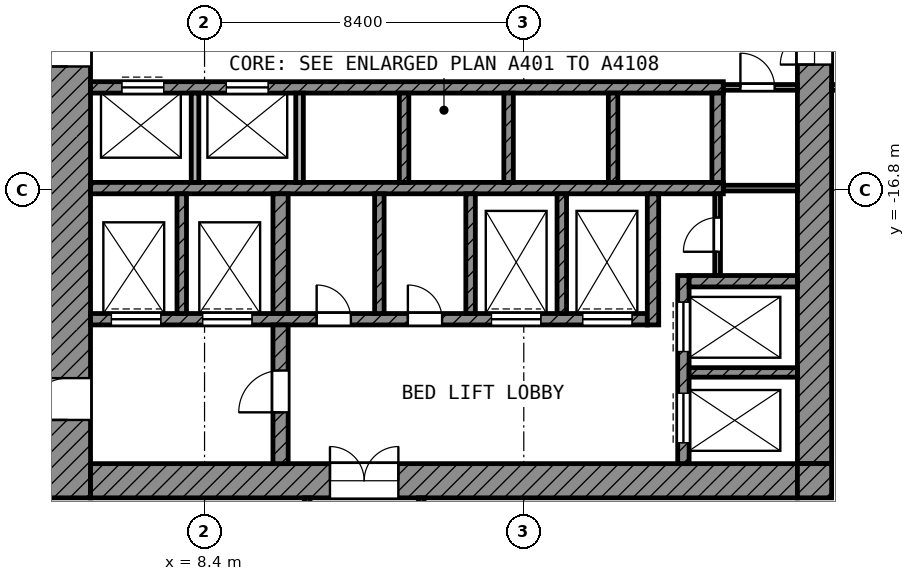
"""IFC4 building model, lengths in metres.
Left out: names, types, materials, properties, quantities, classifications, styles, units other than length and angle.
Written with IfcOpenShell. Run it as: python <this file> out.ifc"""

import sys

from ifc_helpers import new_model, si_unit, direction, frame, frame_2d, origin, place, context, subcontext, project, spatial, rectangle, extrude, element, fill, save


model = new_model("IFC4")
c1 = context("Model", 3, precision=1e-05, world=origin(), true_north=direction((0.0, 1.0)))
c2 = subcontext(c1, "Body", "Model", "MODEL_VIEW")
j1 = project(units=[si_unit("LENGTHUNIT", "METRE"), si_unit("PLANEANGLEUNIT", "RADIAN")], contexts=[c1])
p1 = place(None, origin())
s1 = spatial("IfcSite", under=j1, at=p1, CompositionType="ELEMENT")
p2 = place(p1, origin())
s2 = spatial("IfcBuilding", under=s1, at=p2, CompositionType="ELEMENT")
p3 = place(p2, frame((0.0, 0.0, 175.2)))
s3 = spatial("IfcBuildingStorey", under=s2, at=p3, CompositionType="ELEMENT", Elevation=175.2)
p4 = place(p3, frame((4.8, -24.9, 0.0), z_axis=(0.0, 0.0, 1.0), x_axis=(0.0, 1.0, 0.0)))
e1 = element("IfcWall", 1, at=p4, inside=s3, PredefinedType="SHEAR", context=c2, shape_type="SweptSolid", body=[
    extrude(rectangle(XDim=19.5, YDim=1.2, at=frame_2d((9.75, 0.0))), origin(), (0.0, 0.0, 1.0), 3.6),
])
p5 = place(p4, frame((11.35, 0.0, 0.0)))
e2 = element("IfcOpeningElement", 2, at=p5, cuts=e1, PredefinedType="OPENING", context=c2, shape_type="SweptSolid", body=[
    extrude(rectangle(XDim=1.1, YDim=2.1, at=frame_2d((0.55, 1.05))), frame((0.0, 0.61, 0.0), z_axis=(0.0, -1.0, 0.0), x_axis=(1.0, 0.0, 0.0)), (0.0, 0.0, 1.0), 1.22),
])
p6 = place(p4, frame((2.05, 0.0, 0.0)))
e3 = element("IfcOpeningElement", 3, at=p6, cuts=e1, PredefinedType="OPENING", context=c2, shape_type="SweptSolid", body=[
    extrude(rectangle(XDim=1.1, YDim=2.1, at=frame_2d((0.55, 1.05))), frame((0.0, 0.61, 0.0), z_axis=(0.0, -1.0, 0.0), x_axis=(1.0, 0.0, 0.0)), (0.0, 0.0, 1.0), 1.22),
])
p7 = place(p3, frame((24.45, -24.0, 0.0), z_axis=(0.0, 0.0, 1.0), x_axis=(0.0, 1.0, 0.0)))
e4 = element("IfcWall", 4, at=p7, inside=s3, PredefinedType="SHEAR", context=c2, shape_type="SweptSolid", body=[
    extrude(rectangle(XDim=18.6, YDim=0.9, at=frame_2d((9.3, 0.0))), origin(), (0.0, 0.0, 1.0), 3.6),
])
p8 = place(p7, frame((10.5, 0.0, 0.0)))
e5 = element("IfcOpeningElement", 5, at=p8, cuts=e4, PredefinedType="OPENING", context=c2, shape_type="SweptSolid", body=[
    extrude(rectangle(XDim=1.8, YDim=2.1, at=frame_2d((0.9, 1.05))), frame((0.0, 0.46, 0.0), z_axis=(0.0, -1.0, 0.0), x_axis=(1.0, 0.0, 0.0)), (0.0, 0.0, 1.0), 0.92),
])
p9 = place(p3, frame((5.4, -24.45, 0.0), z_axis=(0.0, 0.0, 1.0), x_axis=(1.0, 0.0, 0.0)))
e6 = element("IfcWall", 6, at=p9, inside=s3, PredefinedType="SHEAR", context=c2, shape_type="SweptSolid", body=[
    extrude(rectangle(XDim=18.6, YDim=0.9, at=frame_2d((9.3, 0.0))), origin(), (0.0, 0.0, 1.0), 3.6),
])
p10 = place(p9, frame((6.3, 0.0, 0.0)))
e7 = element("IfcOpeningElement", 7, at=p10, cuts=e6, PredefinedType="OPENING", context=c2, shape_type="SweptSolid", body=[
    extrude(rectangle(XDim=1.8, YDim=2.1, at=frame_2d((0.9, 1.05))), frame((0.0, 0.46, 0.0), z_axis=(0.0, -1.0, 0.0), x_axis=(1.0, 0.0, 0.0)), (0.0, 0.0, 1.0), 0.92),
])
p11 = place(p3, frame((24.45, -24.9, 0.0), z_axis=(0.0, 0.0, 1.0), x_axis=(0.0, 1.0, 0.0)))
e8 = element("IfcWall", 8, at=p11, inside=s3, PredefinedType="SHEAR", context=c2, shape_type="SweptSolid", body=[
    extrude(rectangle(XDim=0.9, YDim=0.9, at=frame_2d((0.45, 0.0))), origin(), (0.0, 0.0, 1.0), 3.6),
])
p12 = place(p3, frame((5.4, -14.1, 0.0), z_axis=(0.0, 0.0, 1.0), x_axis=(1.0, 0.0, 0.0)))
e9 = element("IfcWall", 9, at=p12, inside=s3, PredefinedType="SHEAR", context=c2, shape_type="SweptSolid", body=[
    extrude(rectangle(XDim=16.65, YDim=0.3, at=frame_2d((8.325, 0.0))), origin(), (0.0, 0.0, 1.0), 3.6),
])
p13 = place(p12, frame((0.825, 0.0, 0.0)))
e10 = element("IfcOpeningElement", 10, at=p13, cuts=e9, PredefinedType="OPENING", context=c2, shape_type="SweptSolid", body=[
    extrude(rectangle(XDim=1.1, YDim=2.1, at=frame_2d((0.55, 1.05))), frame((0.0, 0.16, 0.0), z_axis=(0.0, -1.0, 0.0), x_axis=(1.0, 0.0, 0.0)), (0.0, 0.0, 1.0), 0.32),
])
p14 = place(p12, frame((3.575, 0.0, 0.0)))
e11 = element("IfcOpeningElement", 11, at=p14, cuts=e9, PredefinedType="OPENING", context=c2, shape_type="SweptSolid", body=[
    extrude(rectangle(XDim=1.1, YDim=2.1, at=frame_2d((0.55, 1.05))), frame((0.0, 0.16, 0.0), z_axis=(0.0, -1.0, 0.0), x_axis=(1.0, 0.0, 0.0)), (0.0, 0.0, 1.0), 0.32),
])
p15 = place(p3, frame((5.4, -16.75, 0.0), z_axis=(0.0, 0.0, 1.0), x_axis=(1.0, 0.0, 0.0)))
e12 = element("IfcWall", 12, at=p15, inside=s3, PredefinedType="SHEAR", context=c2, shape_type="SweptSolid", body=[
    extrude(rectangle(XDim=16.65, YDim=0.3, at=frame_2d((8.325, 0.0))), origin(), (0.0, 0.0, 1.0), 3.6),
])
p16 = place(p3, frame((5.4, -20.2, 0.0), z_axis=(0.0, 0.0, 1.0), x_axis=(1.0, 0.0, 0.0)))
e13 = element("IfcWall", 13, at=p16, inside=s3, PredefinedType="SHEAR", context=c2, shape_type="SweptSolid", body=[
    extrude(rectangle(XDim=14.65, YDim=0.3, at=frame_2d((7.325, 0.0))), origin(), (0.0, 0.0, 1.0), 3.6),
])
p17 = place(p16, frame((10.55, 0.0, 0.0)))
e14 = element("IfcOpeningElement", 14, at=p17, cuts=e13, PredefinedType="OPENING", context=c2, shape_type="SweptSolid", body=[
    extrude(rectangle(XDim=1.3, YDim=2.1, at=frame_2d((0.65, 1.05))), frame((0.0, 0.16, 0.0), z_axis=(0.0, -1.0, 0.0), x_axis=(1.0, 0.0, 0.0)), (0.0, 0.0, 1.0), 0.32),
])
p18 = place(p16, frame((12.95, 0.0, 0.0)))
e15 = element("IfcOpeningElement", 15, at=p18, cuts=e13, PredefinedType="OPENING", context=c2, shape_type="SweptSolid", body=[
    extrude(rectangle(XDim=1.3, YDim=2.1, at=frame_2d((0.65, 1.05))), frame((0.0, 0.16, 0.0), z_axis=(0.0, -1.0, 0.0), x_axis=(1.0, 0.0, 0.0)), (0.0, 0.0, 1.0), 0.32),
])
p19 = place(p16, frame((0.55, 0.0, 0.0)))
e16 = element("IfcOpeningElement", 16, at=p19, cuts=e13, PredefinedType="OPENING", context=c2, shape_type="SweptSolid", body=[
    extrude(rectangle(XDim=1.3, YDim=2.1, at=frame_2d((0.65, 1.05))), frame((0.0, 0.16, 0.0), z_axis=(0.0, -1.0, 0.0), x_axis=(1.0, 0.0, 0.0)), (0.0, 0.0, 1.0), 0.32),
])
p20 = place(p16, frame((2.95, 0.0, 0.0)))
e17 = element("IfcOpeningElement", 17, at=p20, cuts=e13, PredefinedType="OPENING", context=c2, shape_type="SweptSolid", body=[
    extrude(rectangle(XDim=1.3, YDim=2.1, at=frame_2d((0.65, 1.05))), frame((0.0, 0.16, 0.0), z_axis=(0.0, -1.0, 0.0), x_axis=(1.0, 0.0, 0.0)), (0.0, 0.0, 1.0), 0.32),
])
p21 = place(p16, frame((5.95, 0.0, 0.0)))
e18 = element("IfcOpeningElement", 18, at=p21, cuts=e13, PredefinedType="OPENING", context=c2, shape_type="SweptSolid", body=[
    extrude(rectangle(XDim=0.9, YDim=2.1, at=frame_2d((0.45, 1.05))), frame((0.0, 0.16, 0.0), z_axis=(0.0, -1.0, 0.0), x_axis=(1.0, 0.0, 0.0)), (0.0, 0.0, 1.0), 0.32),
])
p22 = place(p16, frame((8.35, 0.0, 0.0)))
e19 = element("IfcOpeningElement", 19, at=p22, cuts=e13, PredefinedType="OPENING", context=c2, shape_type="SweptSolid", body=[
    extrude(rectangle(XDim=0.9, YDim=2.1, at=frame_2d((0.45, 1.05))), frame((0.0, 0.16, 0.0), z_axis=(0.0, -1.0, 0.0), x_axis=(1.0, 0.0, 0.0)), (0.0, 0.0, 1.0), 0.32),
])
p23 = place(p3, frame((10.4, -24.0, 0.0), z_axis=(0.0, 0.0, 1.0), x_axis=(0.0, 1.0, 0.0)))
e20 = element("IfcWall", 20, at=p23, inside=s3, PredefinedType="SHEAR", context=c2, shape_type="SweptSolid", body=[
    extrude(rectangle(XDim=3.65, YDim=0.4, at=frame_2d((1.825, 0.0))), origin(), (0.0, 0.0, 1.0), 3.6),
])
p24 = place(p23, frame((1.35, 0.0, 0.0)))
e21 = element("IfcOpeningElement", 21, at=p24, cuts=e20, PredefinedType="OPENING", context=c2, shape_type="SweptSolid", body=[
    extrude(rectangle(XDim=1.1, YDim=2.1, at=frame_2d((0.55, 1.05))), frame((0.0, 0.21, 0.0), z_axis=(0.0, -1.0, 0.0), x_axis=(1.0, 0.0, 0.0)), (0.0, 0.0, 1.0), 0.42),
])
p25 = place(p3, frame((10.4, -20.05, 0.0), z_axis=(0.0, 0.0, 1.0), x_axis=(0.0, 1.0, 0.0)))
e22 = element("IfcWall", 22, at=p25, inside=s3, PredefinedType="SHEAR", context=c2, shape_type="SweptSolid", body=[
    extrude(rectangle(XDim=3.15, YDim=0.4, at=frame_2d((1.575, 0.0))), origin(), (0.0, 0.0, 1.0), 3.6),
])
p26 = place(p3, frame((20.2, -20.35, 0.0), z_axis=(0.0, 0.0, 1.0), x_axis=(0.0, 1.0, 0.0)))
e23 = element("IfcWall", 23, at=p26, inside=s3, PredefinedType="SHEAR", context=c2, shape_type="SweptSolid", body=[
    extrude(rectangle(XDim=3.45, YDim=0.3, at=frame_2d((1.725, 0.0))), origin(), (0.0, 0.0, 1.0), 3.6),
])
p27 = place(p3, frame((21.9, -16.6, 0.0), z_axis=(0.0, 0.0, 1.0), x_axis=(0.0, 1.0, 0.0)))
e24 = element("IfcWall", 24, at=p27, inside=s3, PredefinedType="SHEAR", context=c2, shape_type="SweptSolid", body=[
    extrude(rectangle(XDim=2.35, YDim=0.3, at=frame_2d((1.175, 0.0))), origin(), (0.0, 0.0, 1.0), 3.6),
])
p28 = place(p3, frame((21.15, -19.2, 0.0), z_axis=(0.0, 0.0, 1.0), x_axis=(1.0, 0.0, 0.0)))
e25 = element("IfcWall", 25, at=p28, inside=s3, PredefinedType="SHEAR", context=c2, shape_type="SweptSolid", body=[
    extrude(rectangle(XDim=2.85, YDim=0.3, at=frame_2d((1.425, 0.0))), origin(), (0.0, 0.0, 1.0), 3.6),
])
p29 = place(p3, frame((21.0, -24.0, 0.0), z_axis=(0.0, 0.0, 1.0), x_axis=(0.0, 1.0, 0.0)))
e26 = element("IfcWall", 26, at=p29, inside=s3, PredefinedType="SHEAR", context=c2, shape_type="SweptSolid", body=[
    extrude(rectangle(XDim=4.95, YDim=0.3, at=frame_2d((2.475, 0.0))), origin(), (0.0, 0.0, 1.0), 3.6),
])
p30 = place(p29, frame((2.95, 0.0, 0.0)))
e27 = element("IfcOpeningElement", 27, at=p30, cuts=e26, PredefinedType="OPENING", context=c2, shape_type="SweptSolid", body=[
    extrude(rectangle(XDim=1.3, YDim=2.1, at=frame_2d((0.65, 1.05))), frame((0.0, 0.16, 0.0), z_axis=(0.0, -1.0, 0.0), x_axis=(1.0, 0.0, 0.0)), (0.0, 0.0, 1.0), 0.32),
])
p31 = place(p29, frame((0.55, 0.0, 0.0)))
e28 = element("IfcOpeningElement", 28, at=p31, cuts=e26, PredefinedType="OPENING", context=c2, shape_type="SweptSolid", body=[
    extrude(rectangle(XDim=1.3, YDim=2.1, at=frame_2d((0.65, 1.05))), frame((0.0, 0.16, 0.0), z_axis=(0.0, -1.0, 0.0), x_axis=(1.0, 0.0, 0.0)), (0.0, 0.0, 1.0), 0.32),
])
p32 = place(p3, frame((21.15, -21.6, 0.0), z_axis=(0.0, 0.0, 1.0), x_axis=(1.0, 0.0, 0.0)))
e29 = element("IfcWall", 29, at=p32, inside=s3, PredefinedType="SHEAR", context=c2, shape_type="SweptSolid", body=[
    extrude(rectangle(XDim=2.85, YDim=0.25, at=frame_2d((1.425, 0.0))), origin(), (0.0, 0.0, 1.0), 3.6),
])
for number, where, z_axis, x_axis in (
    (30, (7.8, -20.05, 0.0), (0.0, 0.0, 1.0), (0.0, 1.0, 0.0)),
    (31, (13.0, -20.05, 0.0), (0.0, 0.0, 1.0), (0.0, 1.0, 0.0)),
    (32, (15.4, -20.05, 0.0), (0.0, 0.0, 1.0), (0.0, 1.0, 0.0)),
    (33, (17.8, -20.05, 0.0), (0.0, 0.0, 1.0), (0.0, 1.0, 0.0)),
):
    element("IfcWall", number, at=place(p3, frame(where, z_axis=z_axis, x_axis=x_axis)), inside=s3, PredefinedType="SHEAR", context=c2, shape_type="SweptSolid", body=[
        extrude(rectangle(XDim=3.15, YDim=0.25, at=frame_2d((1.575, 0.0))), origin(), (0.0, 0.0, 1.0), 3.6),
    ])
for number, where, z_axis, x_axis in (
    (34, (8.15, -16.6, 0.0), (0.0, 0.0, 1.0), (0.0, 1.0, 0.0)),
    (35, (10.9, -16.6, 0.0), (0.0, 0.0, 1.0), (0.0, 1.0, 0.0)),
):
    element("IfcWall", number, at=place(p3, frame(where, z_axis=z_axis, x_axis=x_axis)), inside=s3, PredefinedType="PARTITIONING", context=c2, shape_type="SweptSolid", body=[
        extrude(rectangle(XDim=2.35, YDim=0.2, at=frame_2d((1.175, 0.0))), origin(), (0.0, 0.0, 1.0), 3.6),
    ])
for number, where, z_axis, x_axis in (
    (36, (13.65, -16.6, 0.0), (0.0, 0.0, 1.0), (0.0, 1.0, 0.0)),
    (37, (16.4, -16.6, 0.0), (0.0, 0.0, 1.0), (0.0, 1.0, 0.0)),
    (38, (19.15, -16.6, 0.0), (0.0, 0.0, 1.0), (0.0, 1.0, 0.0)),
):
    element("IfcWall", number, at=place(p3, frame(where, z_axis=z_axis, x_axis=x_axis)), inside=s3, PredefinedType="SHEAR", context=c2, shape_type="SweptSolid", body=[
        extrude(rectangle(XDim=2.35, YDim=0.25, at=frame_2d((1.175, 0.0))), origin(), (0.0, 0.0, 1.0), 3.6),
    ])
p33 = place(p3, frame((21.9, -19.05, 0.0), z_axis=(0.0, 0.0, 1.0), x_axis=(0.0, 1.0, 0.0)))
e39 = element("IfcWall", 39, at=p33, inside=s3, PredefinedType="PARTITIONING", context=c2, shape_type="SweptSolid", body=[
    extrude(rectangle(XDim=2.15, YDim=0.15, at=frame_2d((1.075, 0.0))), origin(), (0.0, 0.0, 1.0), 3.6),
])
p34 = place(p33, frame((0.625, 0.0, 0.0)))
e40 = element("IfcOpeningElement", 40, at=p34, cuts=e39, PredefinedType="OPENING", context=c2, shape_type="SweptSolid", body=[
    extrude(rectangle(XDim=0.9, YDim=2.1, at=frame_2d((0.45, 1.05))), frame((0.0, 0.085, 0.0), z_axis=(0.0, -1.0, 0.0), x_axis=(1.0, 0.0, 0.0)), (0.0, 0.0, 1.0), 0.17),
])
p35 = place(p3, frame((22.05, -16.75, 0.0), z_axis=(0.0, 0.0, 1.0), x_axis=(1.0, 0.0, 0.0)))
e41 = element("IfcWall", 41, at=p35, inside=s3, PredefinedType="PARTITIONING", context=c2, shape_type="SweptSolid", body=[
    extrude(rectangle(XDim=1.95, YDim=0.15, at=frame_2d((0.975, 0.0))), origin(), (0.0, 0.0, 1.0), 3.6),
])
p36 = place(p3, frame((22.05, -14.1, 0.0), z_axis=(0.0, 0.0, 1.0), x_axis=(1.0, 0.0, 0.0)))
e42 = element("IfcWall", 42, at=p36, inside=s3, PredefinedType="PARTITIONING", context=c2, shape_type="SweptSolid", body=[
    extrude(rectangle(XDim=1.95, YDim=0.15, at=frame_2d((0.975, 0.0))), origin(), (0.0, 0.0, 1.0), 3.6),
])
p37 = place(p36, frame((0.45, 0.0, 0.0)))
e43 = element("IfcOpeningElement", 43, at=p37, cuts=e42, PredefinedType="OPENING", context=c2, shape_type="SweptSolid", body=[
    extrude(rectangle(XDim=0.9, YDim=2.1, at=frame_2d((0.45, 1.05))), frame((0.0, 0.085, 0.0), z_axis=(0.0, -1.0, 0.0), x_axis=(1.0, 0.0, 0.0)), (0.0, 0.0, 1.0), 0.17),
])
p38 = place(p3, frame((24.9, -14.1, 0.0), z_axis=(0.0, 0.0, 1.0), x_axis=(1.0, 0.0, 0.0)))
e44 = element("IfcWall", 44, at=p38, inside=s3, PredefinedType="PARTITIONING", context=c2, shape_type="SweptSolid", body=[
    extrude(rectangle(XDim=4.425, YDim=0.15, at=frame_2d((2.212, 0.0))), origin(), (0.0, 0.0, 1.0), 3.6),
])
p39 = place(p38, frame((1.65, 0.0, 0.0)))
e45 = element("IfcOpeningElement", 45, at=p39, cuts=e44, PredefinedType="OPENING", context=c2, shape_type="SweptSolid", body=[
    extrude(rectangle(XDim=1.5, YDim=2.1, at=frame_2d((0.75, 1.05))), frame((0.0, 0.085, 0.0), z_axis=(0.0, -1.0, 0.0), x_axis=(1.0, 0.0, 0.0)), (0.0, 0.0, 1.0), 0.17),
])
p40 = place(p3, frame((11.1, -29.398, 0.0), z_axis=(0.0, 0.0, 1.0), x_axis=(0.0, 1.0, 0.0)))
e46 = element("IfcWall", 46, at=p40, inside=s3, PredefinedType="PARTITIONING", context=c2, shape_type="SweptSolid", body=[
    extrude(rectangle(XDim=4.498, YDim=0.15, at=frame_2d((2.249, 0.0))), origin(), (0.0, 0.0, 1.0), 3.6),
])
p41 = place(p3, frame((14.1, -29.4, 0.0), z_axis=(0.0, 0.0, 1.0), x_axis=(0.0, 1.0, 0.0)))
e47 = element("IfcWall", 47, at=p41, inside=s3, PredefinedType="PARTITIONING", context=c2, shape_type="SweptSolid", body=[
    extrude(rectangle(XDim=4.5, YDim=0.15, at=frame_2d((2.25, 0.0))), origin(), (0.0, 0.0, 1.0), 3.6),
])
p42 = place(p13, origin())
e48 = element("IfcDoor", 48, at=p42, inside=s3, OperationType="DOUBLE_DOOR_SLIDING", PredefinedType="DOOR", context=c2, shape_type="SweptSolid", body=[
    extrude(rectangle(XDim=1.1, YDim=2.1, at=frame_2d((0.55, 1.05))), frame((0.0, 0.025, 0.0), z_axis=(0.0, -1.0, 0.0), x_axis=(1.0, 0.0, 0.0)), (0.0, 0.0, 1.0), 0.05),
])
fill(e10, e48)
p43 = place(p14, origin())
e49 = element("IfcDoor", 49, at=p43, inside=s3, OperationType="DOUBLE_DOOR_SLIDING", PredefinedType="DOOR", context=c2, shape_type="SweptSolid", body=[
    extrude(rectangle(XDim=1.1, YDim=2.1, at=frame_2d((0.55, 1.05))), frame((0.0, 0.025, 0.0), z_axis=(0.0, -1.0, 0.0), x_axis=(1.0, 0.0, 0.0)), (0.0, 0.0, 1.0), 0.05),
])
fill(e11, e49)
p44 = place(p30, origin())
e50 = element("IfcDoor", 50, at=p44, inside=s3, OperationType="DOUBLE_DOOR_SLIDING", PredefinedType="DOOR", context=c2, shape_type="SweptSolid", body=[
    extrude(rectangle(XDim=1.3, YDim=2.1, at=frame_2d((0.65, 1.05))), frame((0.0, 0.025, 0.0), z_axis=(0.0, -1.0, 0.0), x_axis=(1.0, 0.0, 0.0)), (0.0, 0.0, 1.0), 0.05),
])
fill(e27, e50)
p45 = place(p31, origin())
e51 = element("IfcDoor", 51, at=p45, inside=s3, OperationType="DOUBLE_DOOR_SLIDING", PredefinedType="DOOR", context=c2, shape_type="SweptSolid", body=[
    extrude(rectangle(XDim=1.3, YDim=2.1, at=frame_2d((0.65, 1.05))), frame((0.0, 0.025, 0.0), z_axis=(0.0, -1.0, 0.0), x_axis=(1.0, 0.0, 0.0)), (0.0, 0.0, 1.0), 0.05),
])
fill(e28, e51)
p46 = place(p17, origin())
e52 = element("IfcDoor", 52, at=p46, inside=s3, OperationType="DOUBLE_DOOR_SLIDING", PredefinedType="DOOR", context=c2, shape_type="SweptSolid", body=[
    extrude(rectangle(XDim=1.3, YDim=2.1, at=frame_2d((0.65, 1.05))), frame((0.0, 0.025, 0.0), z_axis=(0.0, -1.0, 0.0), x_axis=(1.0, 0.0, 0.0)), (0.0, 0.0, 1.0), 0.05),
])
fill(e14, e52)
p47 = place(p18, origin())
e53 = element("IfcDoor", 53, at=p47, inside=s3, OperationType="DOUBLE_DOOR_SLIDING", PredefinedType="DOOR", context=c2, shape_type="SweptSolid", body=[
    extrude(rectangle(XDim=1.3, YDim=2.1, at=frame_2d((0.65, 1.05))), frame((0.0, 0.025, 0.0), z_axis=(0.0, -1.0, 0.0), x_axis=(1.0, 0.0, 0.0)), (0.0, 0.0, 1.0), 0.05),
])
fill(e15, e53)
p48 = place(p19, origin())
e54 = element("IfcDoor", 54, at=p48, inside=s3, OperationType="DOUBLE_DOOR_SLIDING", PredefinedType="DOOR", context=c2, shape_type="SweptSolid", body=[
    extrude(rectangle(XDim=1.3, YDim=2.1, at=frame_2d((0.65, 1.05))), frame((0.0, 0.025, 0.0), z_axis=(0.0, -1.0, 0.0), x_axis=(1.0, 0.0, 0.0)), (0.0, 0.0, 1.0), 0.05),
])
fill(e16, e54)
p49 = place(p20, origin())
e55 = element("IfcDoor", 55, at=p49, inside=s3, OperationType="DOUBLE_DOOR_SLIDING", PredefinedType="DOOR", context=c2, shape_type="SweptSolid", body=[
    extrude(rectangle(XDim=1.3, YDim=2.1, at=frame_2d((0.65, 1.05))), frame((0.0, 0.025, 0.0), z_axis=(0.0, -1.0, 0.0), x_axis=(1.0, 0.0, 0.0)), (0.0, 0.0, 1.0), 0.05),
])
fill(e17, e55)
p50 = place(p5, origin())
e56 = element("IfcDoor", 56, at=p50, inside=s3, OperationType="SINGLE_SWING_LEFT", PredefinedType="DOOR", context=c2, shape_type="SweptSolid", body=[
    extrude(rectangle(XDim=1.1, YDim=2.1, at=frame_2d((0.55, 1.05))), frame((0.0, 0.025, 0.0), z_axis=(0.0, -1.0, 0.0), x_axis=(1.0, 0.0, 0.0)), (0.0, 0.0, 1.0), 0.05),
])
fill(e2, e56)
p51 = place(p6, origin())
e57 = element("IfcDoor", 57, at=p51, inside=s3, OperationType="SINGLE_SWING_LEFT", PredefinedType="DOOR", context=c2, shape_type="SweptSolid", body=[
    extrude(rectangle(XDim=1.1, YDim=2.1, at=frame_2d((0.55, 1.05))), frame((0.0, 0.025, 0.0), z_axis=(0.0, -1.0, 0.0), x_axis=(1.0, 0.0, 0.0)), (0.0, 0.0, 1.0), 0.05),
])
fill(e3, e57)
p52 = place(p24, origin())
e58 = element("IfcDoor", 58, at=p52, inside=s3, OperationType="SINGLE_SWING_LEFT", PredefinedType="DOOR", context=c2, shape_type="SweptSolid", body=[
    extrude(rectangle(XDim=1.1, YDim=2.1, at=frame_2d((0.55, 1.05))), frame((0.0, 0.025, 0.0), z_axis=(0.0, -1.0, 0.0), x_axis=(1.0, 0.0, 0.0)), (0.0, 0.0, 1.0), 0.05),
])
fill(e21, e58)
p53 = place(p8, origin())
e59 = element("IfcDoor", 59, at=p53, inside=s3, OperationType="DOUBLE_DOOR_SINGLE_SWING", PredefinedType="DOOR", context=c2, shape_type="SweptSolid", body=[
    extrude(rectangle(XDim=1.8, YDim=2.1, at=frame_2d((0.9, 1.05))), frame((0.0, 0.025, 0.0), z_axis=(0.0, -1.0, 0.0), x_axis=(1.0, 0.0, 0.0)), (0.0, 0.0, 1.0), 0.05),
])
fill(e5, e59)
p54 = place(p10, origin())
e60 = element("IfcDoor", 60, at=p54, inside=s3, OperationType="DOUBLE_DOOR_SINGLE_SWING", PredefinedType="DOOR", context=c2, shape_type="SweptSolid", body=[
    extrude(rectangle(XDim=1.8, YDim=2.1, at=frame_2d((0.9, 1.05))), frame((0.0, 0.025, 0.0), z_axis=(0.0, -1.0, 0.0), x_axis=(1.0, 0.0, 0.0)), (0.0, 0.0, 1.0), 0.05),
])
fill(e7, e60)
p55 = place(p37, origin())
e61 = element("IfcDoor", 61, at=p55, inside=s3, OperationType="SINGLE_SWING_LEFT", PredefinedType="DOOR", context=c2, shape_type="SweptSolid", body=[
    extrude(rectangle(XDim=0.9, YDim=2.1, at=frame_2d((0.45, 1.05))), frame((0.0, 0.025, 0.0), z_axis=(0.0, -1.0, 0.0), x_axis=(1.0, 0.0, 0.0)), (0.0, 0.0, 1.0), 0.05),
])
fill(e43, e61)
p56 = place(p34, origin())
e62 = element("IfcDoor", 62, at=p56, inside=s3, OperationType="SINGLE_SWING_LEFT", PredefinedType="DOOR", context=c2, shape_type="SweptSolid", body=[
    extrude(rectangle(XDim=0.9, YDim=2.1, at=frame_2d((0.45, 1.05))), frame((0.0, 0.025, 0.0), z_axis=(0.0, -1.0, 0.0), x_axis=(1.0, 0.0, 0.0)), (0.0, 0.0, 1.0), 0.05),
])
fill(e40, e62)
p57 = place(p21, origin())
e63 = element("IfcDoor", 63, at=p57, inside=s3, OperationType="SINGLE_SWING_LEFT", PredefinedType="DOOR", context=c2, shape_type="SweptSolid", body=[
    extrude(rectangle(XDim=0.9, YDim=2.1, at=frame_2d((0.45, 1.05))), frame((0.0, 0.025, 0.0), z_axis=(0.0, -1.0, 0.0), x_axis=(1.0, 0.0, 0.0)), (0.0, 0.0, 1.0), 0.05),
])
fill(e18, e63)
p58 = place(p22, origin())
e64 = element("IfcDoor", 64, at=p58, inside=s3, OperationType="SINGLE_SWING_LEFT", PredefinedType="DOOR", context=c2, shape_type="SweptSolid", body=[
    extrude(rectangle(XDim=0.9, YDim=2.1, at=frame_2d((0.45, 1.05))), frame((0.0, 0.025, 0.0), z_axis=(0.0, -1.0, 0.0), x_axis=(1.0, 0.0, 0.0)), (0.0, 0.0, 1.0), 0.05),
])
fill(e19, e64)
save(model, sys.argv[1])
